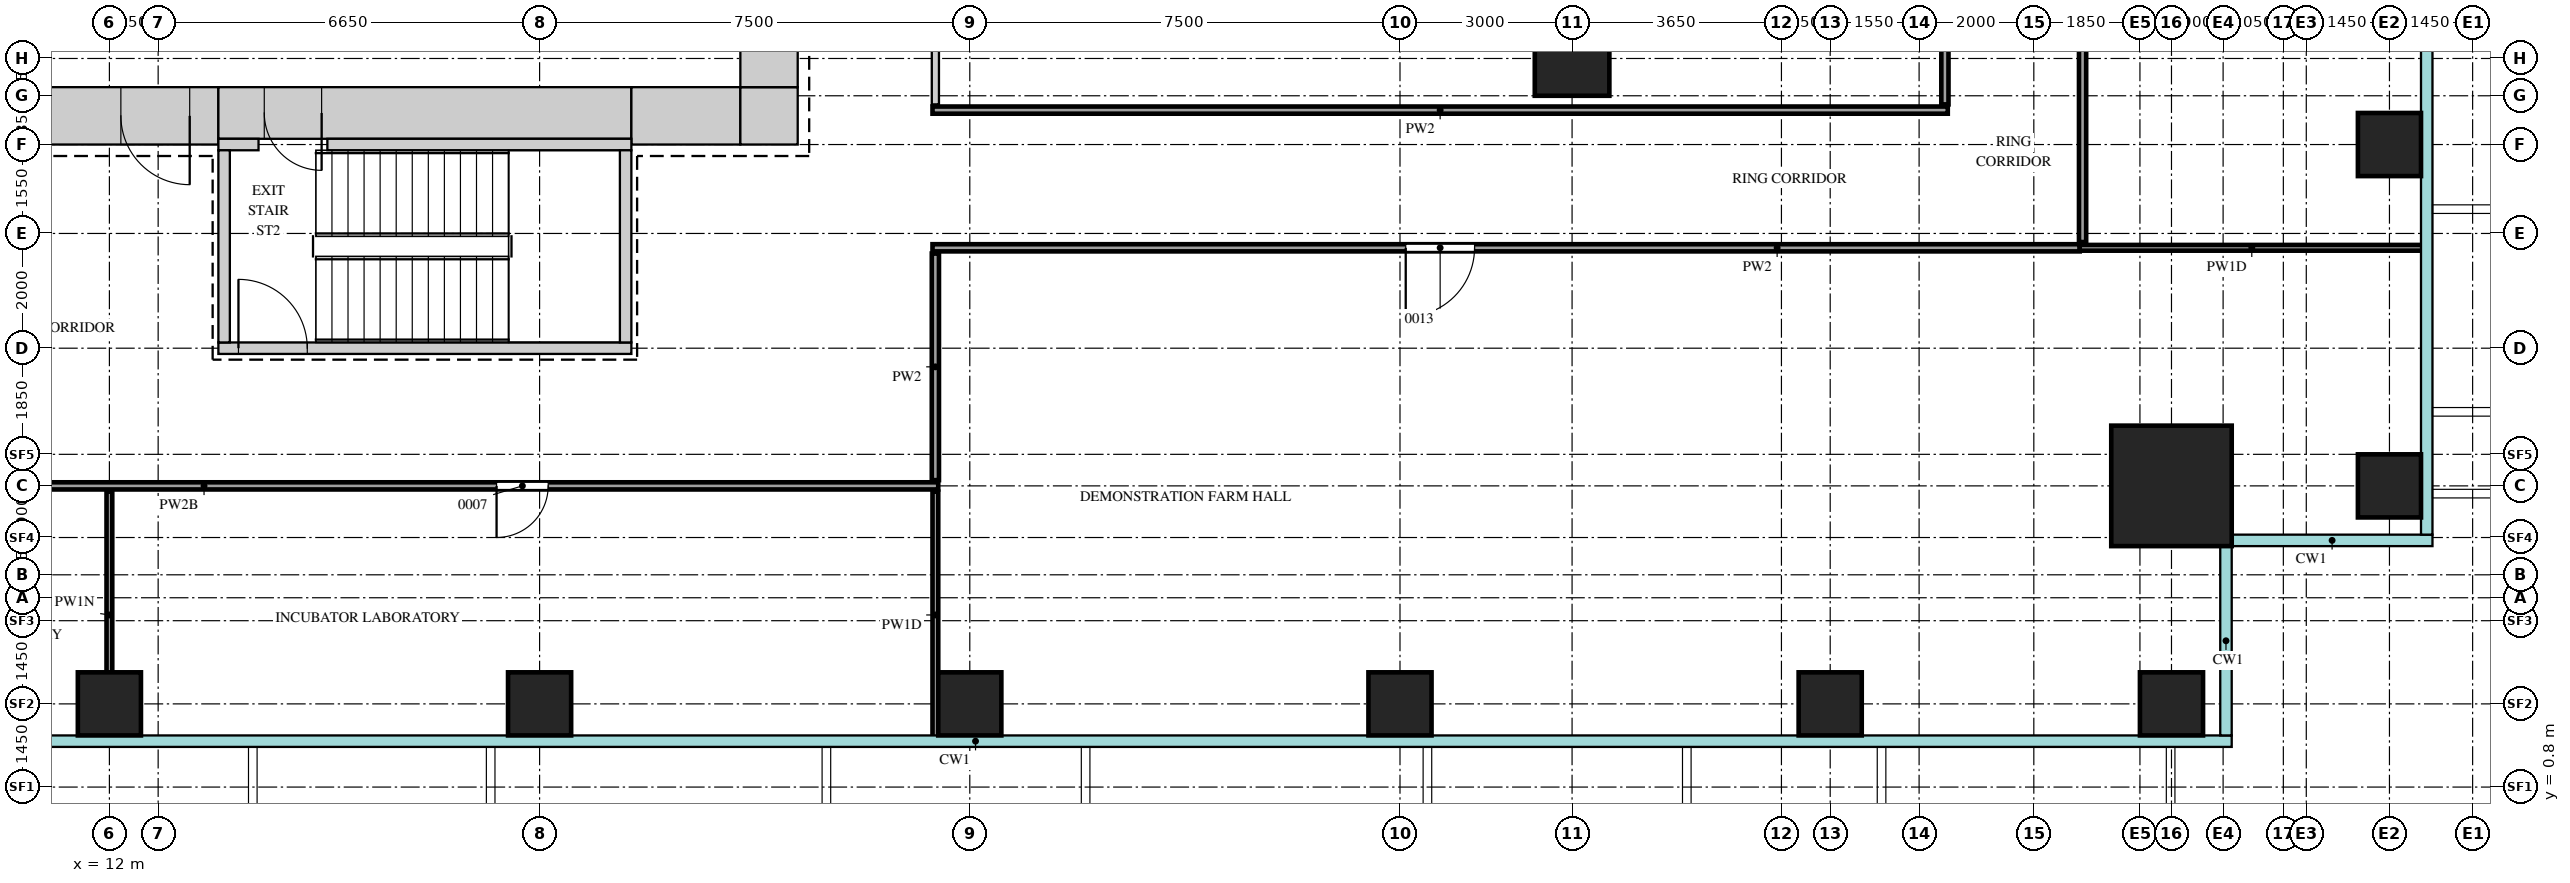
"""IFC4 building model, lengths in metres.
Left out: names, types, materials, properties, quantities, classifications, styles, units other than length and angle.
Written with IfcOpenShell. Run it as: python <this file> out.ifc"""

import sys

from ifc_helpers import new_model, si_unit, direction, frame, frame_2d, origin, origin_2d, place, context, subcontext, project, spatial, rectangle, extrude, source, transform, mapped, element, fill, save


model = new_model("IFC4")
c1 = context("Model", 3, precision=1e-05, world=origin(), true_north=direction((0.0, 1.0)))
c2 = subcontext(c1, "Body", "Model", "MODEL_VIEW")
j1 = project(units=[si_unit("LENGTHUNIT", "METRE"), si_unit("PLANEANGLEUNIT", "RADIAN")], contexts=[c1])
p1 = place(None, origin())
s1 = spatial("IfcSite", under=j1, at=p1, CompositionType="ELEMENT")
p2 = place(p1, origin())
s2 = spatial("IfcBuilding", under=s1, at=p2, CompositionType="ELEMENT")
p3 = place(p2, frame((0.0, 0.0, 154.3)))
s3 = spatial("IfcBuildingStorey", under=s2, at=p3, CompositionType="ELEMENT", Elevation=154.3)
m1 = source(origin(), c2, "Body", "SweptSolid", [
    extrude(rectangle(XDim=6.9, YDim=1.0, at=frame_2d((3.45, 0.0))), origin(), (0.0, 0.0, 1.0), 4.1),
])
p4 = place(p3, frame((7.0, 12.5, 0.0), z_axis=(0.0, 0.0, 1.0), x_axis=(1.0, 0.0, 0.0)))
e1 = element("IfcWall", 1, at=p4, inside=s3, PredefinedType="SHEAR", context=c2, shape_type="MappedRepresentation", body=[
    mapped(m1, transform((0.0, 0.0, 0.0))),
])
m2 = source(origin(), c2, "Body", "SweptSolid", [
    extrude(rectangle(XDim=1.2, YDim=2.1, at=frame_2d((0.6, 1.05))), frame((0.0, 0.51, 0.0), z_axis=(0.0, -1.0, 0.0), x_axis=(1.0, 0.0, 0.0)), (0.0, 0.0, 1.0), 1.02),
])
p5 = place(p4, frame((5.2, 0.0, 0.0)))
e2 = element("IfcOpeningElement", 2, at=p5, cuts=e1, PredefinedType="OPENING", context=c2, shape_type="MappedRepresentation", body=[
    mapped(m2, transform((0.0, 0.0, 0.0))),
])
p6 = place(p4, frame((1.85, 0.0, 0.0)))
e3 = element("IfcOpeningElement", 3, at=p6, cuts=e1, PredefinedType="OPENING", context=c2, shape_type="MappedRepresentation", body=[
    mapped(m2, transform((0.0, 0.0, 0.0))),
])
m3 = source(origin(), c2, "Body", "SweptSolid", [
    extrude(rectangle(XDim=7.2, YDim=0.9, at=frame_2d((3.6, 0.0))), origin(), (0.0, 0.0, 1.0), 4.1),
])
p7 = place(p3, frame((13.9, 12.55, 0.0), z_axis=(0.0, 0.0, 1.0), x_axis=(1.0, 0.0, 0.0)))
e4 = element("IfcWall", 4, at=p7, inside=s3, PredefinedType="SHEAR", context=c2, shape_type="MappedRepresentation", body=[
    mapped(m3, transform((0.0, 0.0, 0.0))),
])
m4 = source(origin(), c2, "Body", "SweptSolid", [
    extrude(rectangle(XDim=1.0, YDim=2.1, at=frame_2d((0.5, 1.05))), frame((0.0, 0.46, 0.0), z_axis=(0.0, -1.0, 0.0), x_axis=(1.0, 0.0, 0.0)), (0.0, 0.0, 1.0), 0.92),
])
p8 = place(p7, frame((0.8, 0.0, 0.0)))
e5 = element("IfcOpeningElement", 5, at=p8, cuts=e4, PredefinedType="OPENING", context=c2, shape_type="MappedRepresentation", body=[
    mapped(m4, transform((0.0, 0.0, 0.0))),
])
m5 = source(origin(), c2, "Body", "SweptSolid", [
    extrude(rectangle(XDim=1.9, YDim=1.0, at=frame_2d((0.95, 0.0))), origin(), (0.0, 0.0, 1.0), 4.1),
])
p9 = place(p3, frame((21.1, 12.5, 0.0), z_axis=(0.0, 0.0, 1.0), x_axis=(1.0, 0.0, 0.0)))
e6 = element("IfcWall", 6, at=p9, inside=s3, PredefinedType="SHEAR", context=c2, shape_type="MappedRepresentation", body=[
    mapped(m5, transform((0.0, 0.0, 0.0))),
])
m6 = source(origin(), c2, "Body", "SweptSolid", [
    extrude(rectangle(XDim=1.0, YDim=1.0, at=frame_2d((0.5, 0.0))), origin(), (0.0, 0.0, 1.0), 4.1),
])
p10 = place(p3, frame((23.0, 12.5, 0.0), z_axis=(0.0, 0.0, 1.0), x_axis=(1.0, 0.0, 0.0)))
e7 = element("IfcWall", 7, at=p10, inside=s3, PredefinedType="SHEAR", context=c2, shape_type="MappedRepresentation", body=[
    mapped(m6, transform((0.0, 0.0, 0.0))),
])
m7 = source(origin(), c2, "Body", "SweptSolid", [
    extrude(rectangle(XDim=28.0, YDim=1.0, at=frame_2d((14.0, 0.0))), origin(), (0.0, 0.0, 1.0), 4.1),
])
p11 = place(p3, frame((23.5, 13.0, 0.0), z_axis=(0.0, 0.0, 1.0), x_axis=(0.0, 1.0, 0.0)))
e8 = element("IfcWall", 8, at=p11, inside=s3, PredefinedType="SHEAR", context=c2, shape_type="MappedRepresentation", body=[
    mapped(m7, transform((0.0, 0.0, 0.0))),
])
m8 = source(origin(), c2, "Body", "SweptSolid", [
    extrude(rectangle(XDim=1.8, YDim=2.1, at=frame_2d((0.9, 1.05))), frame((0.0, 0.51, 0.0), z_axis=(0.0, -1.0, 0.0), x_axis=(1.0, 0.0, 0.0)), (0.0, 0.0, 1.0), 1.02),
])
p12 = place(p11, frame((22.6, 0.0, 0.0)))
e9 = element("IfcOpeningElement", 9, at=p12, cuts=e8, PredefinedType="OPENING", context=c2, shape_type="MappedRepresentation", body=[
    mapped(m8, transform((0.0, 0.0, 0.0))),
])
p13 = place(p11, frame((14.6, 0.0, 0.0)))
e10 = element("IfcOpeningElement", 10, at=p13, cuts=e8, PredefinedType="OPENING", context=c2, shape_type="MappedRepresentation", body=[
    mapped(m2, transform((0.0, 0.0, 0.0))),
])
m9 = source(origin(), c2, "Body", "SweptSolid", [
    extrude(rectangle(XDim=0.9, YDim=2.1, at=frame_2d((0.45, 1.05))), frame((0.0, 0.51, 0.0), z_axis=(0.0, -1.0, 0.0), x_axis=(1.0, 0.0, 0.0)), (0.0, 0.0, 1.0), 1.02),
])
p14 = place(p11, frame((1.35, 0.0, 0.0)))
e11 = element("IfcOpeningElement", 11, at=p14, cuts=e8, PredefinedType="OPENING", context=c2, shape_type="MappedRepresentation", body=[
    mapped(m9, transform((0.0, 0.0, 0.0))),
])
p15 = place(p11, frame((6.2, 0.0, 0.0)))
e12 = element("IfcOpeningElement", 12, at=p15, cuts=e8, PredefinedType="OPENING", context=c2, shape_type="MappedRepresentation", body=[
    mapped(m9, transform((0.0, 0.0, 0.0))),
])
m10 = source(origin(), c2, "Body", "SweptSolid", [
    extrude(rectangle(XDim=0.7, YDim=0.2, at=frame_2d((0.35, 0.0))), origin(), (0.0, 0.0, 1.0), 4.1),
])
p16 = place(p3, frame((13.9, 12.0, 0.0), z_axis=(0.0, 0.0, 1.0), x_axis=(1.0, 0.0, 0.0)))
e13 = element("IfcWall", 13, at=p16, inside=s3, PredefinedType="SHEAR", context=c2, shape_type="MappedRepresentation", body=[
    mapped(m10, transform((0.0, 0.0, 0.0))),
])
m11 = source(origin(), c2, "Body", "SweptSolid", [
    extrude(rectangle(XDim=5.3, YDim=0.2, at=frame_2d((2.65, 0.0))), origin(), (0.0, 0.0, 1.0), 4.1),
])
p17 = place(p3, frame((15.8, 12.0, 0.0), z_axis=(0.0, 0.0, 1.0), x_axis=(1.0, 0.0, 0.0)))
e14 = element("IfcWall", 14, at=p17, inside=s3, PredefinedType="SHEAR", context=c2, shape_type="MappedRepresentation", body=[
    mapped(m11, transform((0.0, 0.0, 0.0))),
])
m12 = source(origin(), c2, "Body", "SweptSolid", [
    extrude(rectangle(XDim=7.2, YDim=0.2, at=frame_2d((3.6, 0.0))), origin(), (0.0, 0.0, 1.0), 4.1),
])
p18 = place(p3, frame((13.9, 8.45, 0.0), z_axis=(0.0, 0.0, 1.0), x_axis=(1.0, 0.0, 0.0)))
e15 = element("IfcWall", 15, at=p18, inside=s3, PredefinedType="SHEAR", context=c2, shape_type="MappedRepresentation", body=[
    mapped(m12, transform((0.0, 0.0, 0.0))),
])
m13 = source(origin(), c2, "Body", "SweptSolid", [
    extrude(rectangle(XDim=1.2, YDim=2.1, at=frame_2d((0.6, 1.05))), frame((0.0, 0.11, 0.0), z_axis=(0.0, -1.0, 0.0), x_axis=(1.0, 0.0, 0.0)), (0.0, 0.0, 1.0), 0.22),
])
p19 = place(p18, frame((0.35, 0.0, 0.0)))
e16 = element("IfcOpeningElement", 16, at=p19, cuts=e15, PredefinedType="OPENING", context=c2, shape_type="MappedRepresentation", body=[
    mapped(m13, transform((0.0, 0.0, 0.0))),
])
m14 = source(origin(), c2, "Body", "SweptSolid", [
    extrude(rectangle(XDim=3.35, YDim=0.2, at=frame_2d((1.675, 0.0))), origin(), (0.0, 0.0, 1.0), 4.1),
])
for number, where, z_axis, x_axis in (
    (17, (21.0, 8.55, 0.0), (0.0, 0.0, 1.0), (0.0, 1.0, 0.0)),
    (18, (14.0, 8.55, 0.0), (0.0, 0.0, 1.0), (0.0, 1.0, 0.0)),
):
    element("IfcWall", number, at=place(p3, frame(where, z_axis=z_axis, x_axis=x_axis)), inside=s3, PredefinedType="SHEAR", context=c2, shape_type="MappedRepresentation", body=[
        mapped(m14, transform((0.0, 0.0, 0.0))),
    ])
m15 = source(origin(), c2, "Body", "SweptSolid", [
    extrude(rectangle(XDim=2.1, YDim=2.1, at=origin_2d()), origin(), (0.0, 0.0, 1.0), 4.4),
])
p20 = place(p3, frame((47.95, 6.05, 0.0), z_axis=(0.0, 0.0, 1.0), x_axis=(1.0, 0.0, 0.0)))
e19 = element("IfcColumn", 19, at=p20, inside=s3, PredefinedType="COLUMN", context=c2, shape_type="MappedRepresentation", body=[
    mapped(m15, transform((0.0, 0.0, 0.0))),
])
m16 = source(origin(), c2, "Body", "SweptSolid", [
    extrude(rectangle(XDim=1.1, YDim=1.1, at=origin_2d()), origin(), (0.0, 0.0, 1.0), 4.4),
])
for number, where, z_axis, x_axis in (
    (20, (12.0, 2.25, 0.0), (0.0, 0.0, 1.0), (1.0, 0.0, 0.0)),
    (21, (19.5, 2.25, 0.0), (0.0, 0.0, 1.0), (1.0, 0.0, 0.0)),
    (22, (27.0, 2.25, 0.0), (0.0, 0.0, 1.0), (1.0, 0.0, 0.0)),
    (23, (34.5, 2.25, 0.0), (0.0, 0.0, 1.0), (1.0, 0.0, 0.0)),
    (24, (42.0, 2.25, 0.0), (0.0, 0.0, 1.0), (1.0, 0.0, 0.0)),
    (25, (47.95, 2.25, 0.0), (0.0, 0.0, 1.0), (1.0, 0.0, 0.0)),
    (26, (51.75, 6.05, 0.0), (0.0, 0.0, 1.0), (1.0, 0.0, 0.0)),
    (27, (51.75, 12.0, 0.0), (0.0, 0.0, 1.0), (1.0, 0.0, 0.0)),
):
    element("IfcColumn", number, at=place(p3, frame(where, z_axis=z_axis, x_axis=x_axis)), inside=s3, PredefinedType="COLUMN", context=c2, shape_type="MappedRepresentation", body=[
        mapped(m16, transform((0.0, 0.0, 0.0))),
    ])
m17 = source(origin(), c2, "Body", "SweptSolid", [
    extrude(rectangle(XDim=1.3, YDim=1.3, at=origin_2d()), origin(), (0.0, 0.0, 1.0), 4.4),
])
p21 = place(p3, frame((37.5, 13.5, 0.0), z_axis=(0.0, 0.0, 1.0), x_axis=(1.0, 0.0, 0.0)))
e28 = element("IfcColumn", 28, at=p21, inside=s3, PredefinedType="COLUMN", context=c2, shape_type="MappedRepresentation", body=[
    mapped(m17, transform((0.0, 0.0, 0.0))),
])
m18 = source(origin(), c2, "Body", "SweptSolid", [
    extrude(rectangle(XDim=4.3, YDim=0.1, at=frame_2d((2.15, 0.0))), origin(), (0.0, 0.0, 1.0), 3.5),
])
p22 = place(p3, frame((12.0, 1.65, 0.0), z_axis=(0.0, 0.0, 1.0), x_axis=(0.0, 1.0, 0.0)))
e29 = element("IfcWall", 29, at=p22, inside=s3, PredefinedType="PARTITIONING", context=c2, shape_type="MappedRepresentation", body=[
    mapped(m18, transform((0.0, 0.0, 0.0))),
])
m19 = source(origin(), c2, "Body", "SweptSolid", [
    extrude(rectangle(XDim=4.3, YDim=0.1, at=frame_2d((2.15, 0.0))), origin(), (0.0, 0.0, 1.0), 4.2),
])
p23 = place(p3, frame((26.4, 1.65, 0.0), z_axis=(0.0, 0.0, 1.0), x_axis=(0.0, 1.0, 0.0)))
e30 = element("IfcWall", 30, at=p23, inside=s3, PredefinedType="PARTITIONING", context=c2, shape_type="MappedRepresentation", body=[
    mapped(m19, transform((0.0, 0.0, 0.0))),
])
m20 = source(origin(), c2, "Body", "SweptSolid", [
    extrude(rectangle(XDim=22.3, YDim=0.125, at=frame_2d((11.15, 0.0))), origin(), (0.0, 0.0, 1.0), 3.4),
])
p24 = place(p3, frame((4.15, 6.05, 0.0), z_axis=(0.0, 0.0, 1.0), x_axis=(1.0, 0.0, 0.0)))
e31 = element("IfcWall", 31, at=p24, inside=s3, PredefinedType="PARTITIONING", context=c2, shape_type="MappedRepresentation", body=[
    mapped(m20, transform((0.0, 0.0, 0.0))),
])
m21 = source(origin(), c2, "Body", "SweptSolid", [
    extrude(rectangle(XDim=0.9, YDim=2.1, at=frame_2d((0.45, 1.05))), frame((0.0, 0.073, 0.0), z_axis=(0.0, -1.0, 0.0), x_axis=(1.0, 0.0, 0.0)), (0.0, 0.0, 1.0), 0.145),
])
p25 = place(p24, frame((3.5, 0.0, 0.0)))
e32 = element("IfcOpeningElement", 32, at=p25, cuts=e31, PredefinedType="OPENING", context=c2, shape_type="MappedRepresentation", body=[
    mapped(m21, transform((0.0, 0.0, 0.0))),
])
p26 = place(p24, frame((14.6, 0.0, 0.0)))
e33 = element("IfcOpeningElement", 33, at=p26, cuts=e31, PredefinedType="OPENING", context=c2, shape_type="MappedRepresentation", body=[
    mapped(m21, transform((0.0, 0.0, 0.0))),
])
m22 = source(origin(), c2, "Body", "SweptSolid", [
    extrude(rectangle(XDim=3.95, YDim=0.125, at=frame_2d((1.975, 0.0))), origin(), (0.0, 0.0, 1.0), 4.2),
])
p27 = place(p3, frame((26.4, 6.15, 0.0), z_axis=(0.0, 0.0, 1.0), x_axis=(0.0, 1.0, 0.0)))
e34 = element("IfcWall", 34, at=p27, inside=s3, PredefinedType="PARTITIONING", context=c2, shape_type="MappedRepresentation", body=[
    mapped(m22, transform((0.0, 0.0, 0.0))),
])
m23 = source(origin(), c2, "Body", "SweptSolid", [
    extrude(rectangle(XDim=20.0, YDim=0.125, at=frame_2d((10.0, 0.0))), origin(), (0.0, 0.0, 1.0), 4.2),
])
p28 = place(p3, frame((26.35, 10.2, 0.0), z_axis=(0.0, 0.0, 1.0), x_axis=(1.0, 0.0, 0.0)))
e35 = element("IfcWall", 35, at=p28, inside=s3, PredefinedType="PARTITIONING", context=c2, shape_type="MappedRepresentation", body=[
    mapped(m23, transform((0.0, 0.0, 0.0))),
])
m24 = source(origin(), c2, "Body", "SweptSolid", [
    extrude(rectangle(XDim=1.2, YDim=2.1, at=frame_2d((0.6, 1.05))), frame((0.0, 0.073, 0.0), z_axis=(0.0, -1.0, 0.0), x_axis=(1.0, 0.0, 0.0)), (0.0, 0.0, 1.0), 0.145),
])
p29 = place(p28, frame((8.25, 0.0, 0.0)))
e36 = element("IfcOpeningElement", 36, at=p29, cuts=e35, PredefinedType="OPENING", context=c2, shape_type="MappedRepresentation", body=[
    mapped(m24, transform((0.0, 0.0, 0.0))),
])
m25 = source(origin(), c2, "Body", "SweptSolid", [
    extrude(rectangle(XDim=6.0, YDim=0.1, at=frame_2d((3.0, 0.0))), origin(), (0.0, 0.0, 1.0), 4.2),
])
p30 = place(p3, frame((46.35, 10.2, 0.0), z_axis=(0.0, 0.0, 1.0), x_axis=(1.0, 0.0, 0.0)))
e37 = element("IfcWall", 37, at=p30, inside=s3, PredefinedType="PARTITIONING", context=c2, shape_type="MappedRepresentation", body=[
    mapped(m25, transform((0.0, 0.0, 0.0))),
])
m26 = source(origin(), c2, "Body", "SweptSolid", [
    extrude(rectangle(XDim=37.65, YDim=0.125, at=frame_2d((18.825, 0.0))), origin(), (0.0, 0.0, 1.0), 4.2),
])
p31 = place(p3, frame((46.4, 10.3, 0.0), z_axis=(0.0, 0.0, 1.0), x_axis=(0.0, 1.0, 0.0)))
e38 = element("IfcWall", 38, at=p31, inside=s3, PredefinedType="PARTITIONING", context=c2, shape_type="MappedRepresentation", body=[
    mapped(m26, transform((0.0, 0.0, 0.0))),
])
p32 = place(p31, frame((7.85, 0.0, 0.0)))
e39 = element("IfcOpeningElement", 39, at=p32, cuts=e38, PredefinedType="OPENING", context=c2, shape_type="MappedRepresentation", body=[
    mapped(m21, transform((0.0, 0.0, 0.0))),
])
p33 = place(p31, frame((25.4, 0.0, 0.0)))
e40 = element("IfcOpeningElement", 40, at=p33, cuts=e38, PredefinedType="OPENING", context=c2, shape_type="MappedRepresentation", body=[
    mapped(m24, transform((0.0, 0.0, 0.0))),
])
m27 = source(origin(), c2, "Body", "SweptSolid", [
    extrude(rectangle(XDim=17.7, YDim=0.125, at=frame_2d((8.85, 0.0))), origin(), (0.0, 0.0, 1.0), 4.2),
])
p34 = place(p3, frame((26.35, 12.6, 0.0), z_axis=(0.0, 0.0, 1.0), x_axis=(1.0, 0.0, 0.0)))
e41 = element("IfcWall", 41, at=p34, inside=s3, PredefinedType="PARTITIONING", context=c2, shape_type="MappedRepresentation", body=[
    mapped(m27, transform((0.0, 0.0, 0.0))),
])
m28 = source(origin(), c2, "Body", "SweptSolid", [
    extrude(rectangle(XDim=23.2, YDim=0.125, at=frame_2d((11.6, 0.0))), origin(), (0.0, 0.0, 1.0), 4.2),
])
p35 = place(p3, frame((26.4, 12.7, 0.0), z_axis=(0.0, 0.0, 1.0), x_axis=(0.0, 1.0, 0.0)))
e42 = element("IfcWall", 42, at=p35, inside=s3, PredefinedType="PARTITIONING", context=c2, shape_type="MappedRepresentation", body=[
    mapped(m28, transform((0.0, 0.0, 0.0))),
])
p36 = place(p35, frame((6.65, 0.0, 0.0)))
e43 = element("IfcOpeningElement", 43, at=p36, cuts=e42, PredefinedType="OPENING", context=c2, shape_type="MappedRepresentation", body=[
    mapped(m24, transform((0.0, 0.0, 0.0))),
])
m29 = source(origin(), c2, "Body", "SweptSolid", [
    extrude(rectangle(XDim=32.85, YDim=0.125, at=frame_2d((16.425, 0.0))), origin(), (0.0, 0.0, 1.0), 4.2),
])
p37 = place(p3, frame((44.0, 12.7, 0.0), z_axis=(0.0, 0.0, 1.0), x_axis=(0.0, 1.0, 0.0)))
e44 = element("IfcWall", 44, at=p37, inside=s3, PredefinedType="PARTITIONING", context=c2, shape_type="MappedRepresentation", body=[
    mapped(m29, transform((0.0, 0.0, 0.0))),
])
p38 = place(p37, frame((18.2, 0.0, 0.0)))
e45 = element("IfcOpeningElement", 45, at=p38, cuts=e44, PredefinedType="OPENING", context=c2, shape_type="MappedRepresentation", body=[
    mapped(m24, transform((0.0, 0.0, 0.0))),
])
p39 = place(p37, frame((27.5, 0.0, 0.0)))
e46 = element("IfcOpeningElement", 46, at=p39, cuts=e44, PredefinedType="OPENING", context=c2, shape_type="MappedRepresentation", body=[
    mapped(m24, transform((0.0, 0.0, 0.0))),
])
m30 = source(origin(), c2, "Body", "SweptSolid", [
    extrude(rectangle(XDim=1.2, YDim=2.1, at=frame_2d((0.6, 1.05))), frame((0.0, 0.45, 0.0), z_axis=(0.0, -1.0, 0.0), x_axis=(1.0, 0.0, 0.0)), (0.0, 0.0, 1.0), 0.9),
])
p40 = place(p5, origin())
e47 = element("IfcDoor", 47, at=p40, inside=s3, OperationType="SINGLE_SWING_RIGHT", PredefinedType="DOOR", context=c2, shape_type="MappedRepresentation", body=[
    mapped(m30, transform((0.0, 0.0, 0.0))),
])
fill(e2, e47)
m31 = source(origin(), c2, "Body", "SweptSolid", [
    extrude(rectangle(XDim=1.0, YDim=2.1, at=frame_2d((0.5, 1.05))), frame((0.0, 0.4, 0.0), z_axis=(0.0, -1.0, 0.0), x_axis=(1.0, 0.0, 0.0)), (0.0, 0.0, 1.0), 0.8),
])
p41 = place(p8, origin())
e48 = element("IfcDoor", 48, at=p41, inside=s3, OperationType="SINGLE_SWING_RIGHT", PredefinedType="DOOR", context=c2, shape_type="MappedRepresentation", body=[
    mapped(m31, transform((0.0, 0.0, 0.0))),
])
fill(e5, e48)
m32 = source(origin(), c2, "Body", "SweptSolid", [
    extrude(rectangle(XDim=1.2, YDim=2.1, at=frame_2d((0.6, 1.05))), frame((0.0, 0.025, 0.0), z_axis=(0.0, -1.0, 0.0), x_axis=(1.0, 0.0, 0.0)), (0.0, 0.0, 1.0), 0.05),
])
p42 = place(p29, origin())
e49 = element("IfcDoor", 49, at=p42, inside=s3, OperationType="SINGLE_SWING_LEFT", PredefinedType="DOOR", context=c2, shape_type="MappedRepresentation", body=[
    mapped(m32, transform((0.0, 0.0, 0.0))),
])
fill(e36, e49)
m33 = source(origin(), c2, "Body", "SweptSolid", [
    extrude(rectangle(XDim=0.9, YDim=2.1, at=frame_2d((0.45, 1.05))), frame((0.0, 0.025, 0.0), z_axis=(0.0, -1.0, 0.0), x_axis=(1.0, 0.0, 0.0)), (0.0, 0.0, 1.0), 0.05),
])
p43 = place(p26, origin())
e50 = element("IfcDoor", 50, at=p43, inside=s3, OperationType="SINGLE_SWING_LEFT", PredefinedType="DOOR", context=c2, shape_type="MappedRepresentation", body=[
    mapped(m33, transform((0.0, 0.0, 0.0))),
])
fill(e33, e50)
p44 = place(p19, origin())
e51 = element("IfcDoor", 51, at=p44, inside=s3, OperationType="SINGLE_SWING_RIGHT", PredefinedType="DOOR", context=c2, shape_type="MappedRepresentation", body=[
    mapped(m32, transform((0.0, 0.0, 0.0))),
])
fill(e16, e51)
save(model, sys.argv[1])
